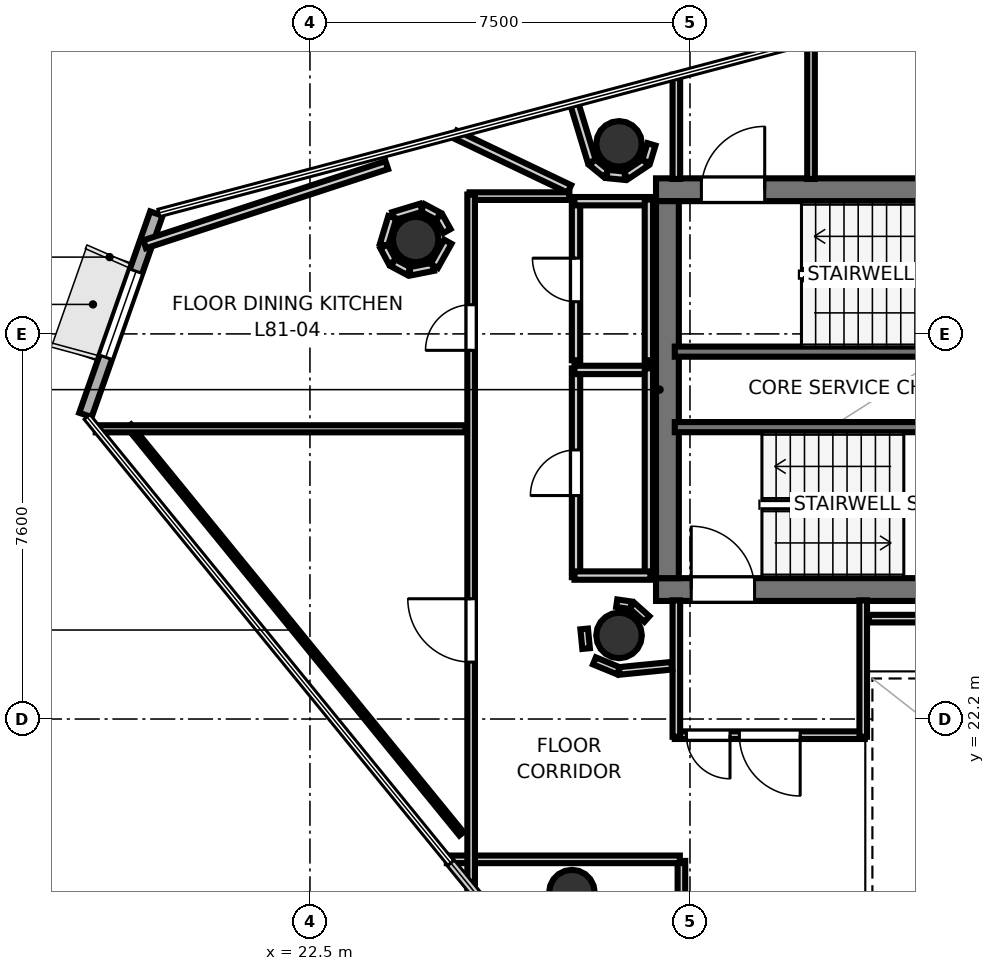
"""IFC4 building model, lengths in metres.
Left out: names, types, materials, properties, quantities, classifications, styles, units other than length and angle.
Written with IfcOpenShell. Run it as: python <this file> out.ifc"""

import sys

from ifc_helpers import new_model, si_unit, direction, frame, frame_2d, origin, origin_2d, place, context, subcontext, project, spatial, rectangle, hollow_circle, extrude, element, fill, save


model = new_model("IFC4")
c1 = context("Model", 3, precision=1e-05, world=origin(), true_north=direction((0.0, 1.0)))
c2 = subcontext(c1, "Body", "Model", "MODEL_VIEW")
j1 = project(units=[si_unit("LENGTHUNIT", "METRE"), si_unit("PLANEANGLEUNIT", "RADIAN")], contexts=[c1])
p1 = place(None, origin())
s1 = spatial("IfcSite", under=j1, at=p1, CompositionType="ELEMENT")
p2 = place(p1, origin())
s2 = spatial("IfcBuilding", under=s1, at=p2, CompositionType="ELEMENT")
p3 = place(p2, frame((0.0, 0.0, 313.9)))
s3 = spatial("IfcBuildingStorey", under=s2, at=p3, CompositionType="ELEMENT", Elevation=313.9)
p4 = place(p3, frame((29.33, 32.645, 0.0), z_axis=(0.0, 0.0, 1.0), x_axis=(1.0, 0.0, 0.0)))
e1 = element("IfcWall", 1, at=p4, inside=s3, PredefinedType="SHEAR", context=c2, shape_type="SweptSolid", body=[
    extrude(rectangle(XDim=10.52, YDim=0.45, at=frame_2d((5.26, 0.0))), origin(), (0.0, 0.0, 1.0), 3.52),
])
p5 = place(p4, frame((0.895, 0.0, 0.0)))
e2 = element("IfcOpeningElement", 2, at=p5, cuts=e1, PredefinedType="OPENING", context=c2, shape_type="SweptSolid", body=[
    extrude(rectangle(XDim=1.25, YDim=2.15, at=frame_2d((0.625, 1.075))), frame((0.0, 0.235, 0.0), z_axis=(0.0, -1.0, 0.0), x_axis=(1.0, 0.0, 0.0)), (0.0, 0.0, 1.0), 0.47),
])
p6 = place(p3, frame((29.33, 24.755, 0.0), z_axis=(0.0, 0.0, 1.0), x_axis=(1.0, 0.0, 0.0)))
e3 = element("IfcWall", 3, at=p6, inside=s3, PredefinedType="SHEAR", context=c2, shape_type="SweptSolid", body=[
    extrude(rectangle(XDim=10.52, YDim=0.45, at=frame_2d((5.26, 0.0))), origin(), (0.0, 0.0, 1.0), 3.52),
])
p7 = place(p6, frame((0.695, 0.0, 0.0)))
e4 = element("IfcOpeningElement", 4, at=p7, cuts=e3, PredefinedType="OPENING", context=c2, shape_type="SweptSolid", body=[
    extrude(rectangle(XDim=1.25, YDim=2.15, at=frame_2d((0.625, 1.075))), frame((0.0, 0.235, 0.0), z_axis=(0.0, -1.0, 0.0), x_axis=(1.0, 0.0, 0.0)), (0.0, 0.0, 1.0), 0.47),
])
p8 = place(p3, frame((29.555, 24.98, 0.0), z_axis=(0.0, 0.0, 1.0), x_axis=(0.0, 1.0, 0.0)))
e5 = element("IfcWall", 5, at=p8, inside=s3, PredefinedType="SHEAR", context=c2, shape_type="SweptSolid", body=[
    extrude(rectangle(XDim=7.44, YDim=0.45, at=frame_2d((3.72, 0.0))), origin(), (0.0, 0.0, 1.0), 3.52),
])
for number, where, z_axis, x_axis in (
    (6, (28.6, 33.55, 0.0), (0.0, 0.0, 1.0), (1.0, 0.0, 0.0)),
    (7, (28.6, 23.85, 0.0), (0.0, 0.0, 1.0), (1.0, 0.0, 0.0)),
    (8, (24.587, 31.663, 0.0), (0.0, 0.0, 1.0), (1.0, 0.0, 0.0)),
    (9, (27.67, 18.774, 0.0), (0.0, 0.0, 1.0), (1.0, 0.0, 0.0)),
):
    element("IfcColumn", number, at=place(p3, frame(where, z_axis=z_axis, x_axis=x_axis)), inside=s3, PredefinedType="COLUMN", context=c2, shape_type="SweptSolid", body=[
        extrude(hollow_circle(Radius=0.45, WallThickness=0.025, at=origin_2d()), origin(), (0.0, 0.0, 1.0), 3.7),
    ])
p9 = place(p3, frame((19.469, 32.174, 0.0), z_axis=(0.0, 0.0, 1.0), x_axis=(-0.332383607954, -0.943144282262, 0.0)))
e10 = element("IfcWall", 10, at=p9, inside=s3, PredefinedType="SOLIDWALL", context=c2, shape_type="SweptSolid", body=[
    extrude(rectangle(XDim=4.213, YDim=0.26, at=frame_2d((2.106, 0.0))), origin(), (0.0, 0.0, 1.0), 3.52),
])
p10 = place(p9, frame((1.207, 0.0, 0.85)))
e11 = element("IfcOpeningElement", 11, at=p10, cuts=e10, PredefinedType="OPENING", context=c2, shape_type="SweptSolid", body=[
    extrude(rectangle(XDim=1.8, YDim=2.1, at=frame_2d((0.9, 1.05))), frame((0.0, 0.14, 0.0), z_axis=(0.0, -1.0, 0.0), x_axis=(1.0, 0.0, 0.0)), (0.0, 0.0, 1.0), 0.28),
])
p11 = place(p3, frame((29.7, 29.45, 0.0), z_axis=(0.0, 0.0, 1.0), x_axis=(1.0, 0.0, 0.0)))
e12 = element("IfcWall", 12, at=p11, inside=s3, PredefinedType="SOLIDWALL", context=c2, shape_type="SweptSolid", body=[
    extrude(rectangle(XDim=8.3, YDim=0.2, at=frame_2d((4.15, 0.0))), origin(), (0.0, 0.0, 1.0), 3.52),
])
p12 = place(p3, frame((29.7, 27.96, 0.0), z_axis=(0.0, 0.0, 1.0), x_axis=(1.0, 0.0, 0.0)))
e13 = element("IfcWall", 13, at=p12, inside=s3, PredefinedType="SOLIDWALL", context=c2, shape_type="SweptSolid", body=[
    extrude(rectangle(XDim=7.75, YDim=0.2, at=frame_2d((3.875, 0.0))), origin(), (0.0, 0.0, 1.0), 3.52),
])
p13 = place(p3, frame((32.389, 35.619, 0.0), z_axis=(0.0, 0.0, 1.0), x_axis=(0.0, -1.0, 0.0)))
e14 = element("IfcWall", 14, at=p13, inside=s3, PredefinedType="PARTITIONING", context=c2, shape_type="SweptSolid", body=[
    extrude(rectangle(XDim=2.761, YDim=0.15, at=frame_2d((1.381, 0.0))), origin(), (0.0, 0.0, 1.0), 2.84),
])
p14 = place(p3, frame((29.731, 32.858, 0.0), z_axis=(0.0, 0.0, 1.0), x_axis=(0.0, 1.0, 0.0)))
e15 = element("IfcWall", 15, at=p14, inside=s3, PredefinedType="PARTITIONING", context=c2, shape_type="SweptSolid", body=[
    extrude(rectangle(XDim=2.057, YDim=0.15, at=frame_2d((1.028, 0.0))), origin(), (0.0, 0.0, 1.0), 2.84),
])
p15 = place(p3, frame((33.45, 21.881, 0.0), z_axis=(0.0, 0.0, 1.0), x_axis=(-1.0, 0.0, 0.0)))
e16 = element("IfcWall", 16, at=p15, inside=s3, PredefinedType="PARTITIONING", context=c2, shape_type="SweptSolid", body=[
    extrude(rectangle(XDim=3.75, YDim=0.15, at=frame_2d((1.875, 0.0))), origin(), (0.0, 0.0, 1.0), 2.84),
])
p16 = place(p15, frame((1.275, 0.0, 0.0)))
e17 = element("IfcOpeningElement", 17, at=p16, cuts=e16, PredefinedType="OPENING", context=c2, shape_type="SweptSolid", body=[
    extrude(rectangle(XDim=1.2, YDim=2.15, at=frame_2d((0.6, 1.075))), frame((0.0, 0.085, 0.0), z_axis=(0.0, -1.0, 0.0), x_axis=(1.0, 0.0, 0.0)), (0.0, 0.0, 1.0), 0.17),
])
p17 = place(p15, frame((2.66, 0.0, 0.0)))
e18 = element("IfcOpeningElement", 18, at=p17, cuts=e16, PredefinedType="OPENING", context=c2, shape_type="SweptSolid", body=[
    extrude(rectangle(XDim=0.86, YDim=2.05, at=frame_2d((0.43, 1.025))), frame((0.0, 0.085, 0.0), z_axis=(0.0, -1.0, 0.0), x_axis=(1.0, 0.0, 0.0)), (0.0, 0.0, 1.0), 0.17),
])
for number, where, z_axis, x_axis in (
    (19, (29.731, 21.85, 0.0), (0.0, 0.0, 1.0), (0.0, 1.0, 0.0)),
    (20, (33.419, 24.542, 0.0), (0.0, 0.0, 1.0), (0.0, -1.0, 0.0)),
):
    element("IfcWall", number, at=place(p3, frame(where, z_axis=z_axis, x_axis=x_axis)), inside=s3, PredefinedType="PARTITIONING", context=c2, shape_type="SweptSolid", body=[
        extrude(rectangle(XDim=2.692, YDim=0.15, at=frame_2d((1.346, 0.0))), origin(), (0.0, 0.0, 1.0), 2.84),
    ])
p18 = place(p3, frame((27.751, 25.0, 0.0), z_axis=(0.0, 0.0, 1.0), x_axis=(0.0, 1.0, 0.0)))
e21 = element("IfcWall", 21, at=p18, inside=s3, PredefinedType="PLUMBINGWALL", context=c2, shape_type="SweptSolid", body=[
    extrude(rectangle(XDim=4.12, YDim=0.165, at=frame_2d((2.06, 0.0))), origin(), (0.0, 0.0, 1.0), 2.84),
])
p19 = place(p18, frame((1.61, 0.0, 0.0)))
e22 = element("IfcOpeningElement", 22, at=p19, cuts=e21, PredefinedType="OPENING", context=c2, shape_type="SweptSolid", body=[
    extrude(rectangle(XDim=0.9, YDim=2.1, at=frame_2d((0.45, 1.05))), frame((0.0, 0.093, 0.0), z_axis=(0.0, -1.0, 0.0), x_axis=(1.0, 0.0, 0.0)), (0.0, 0.0, 1.0), 0.185),
])
p20 = place(p3, frame((27.72, 29.089, 0.0), z_axis=(0.0, 0.0, 1.0), x_axis=(1.0, 0.0, 0.0)))
e23 = element("IfcWall", 23, at=p20, inside=s3, PredefinedType="PLUMBINGWALL", context=c2, shape_type="SweptSolid", body=[
    extrude(rectangle(XDim=1.5, YDim=0.165, at=frame_2d((0.75, 0.0))), origin(), (0.0, 0.0, 1.0), 2.84),
])
p21 = place(p3, frame((29.189, 29.12, 0.0), z_axis=(0.0, 0.0, 1.0), x_axis=(0.0, -1.0, 0.0)))
e24 = element("IfcWall", 24, at=p21, inside=s3, PredefinedType="PLUMBINGWALL", context=c2, shape_type="SweptSolid", body=[
    extrude(rectangle(XDim=4.12, YDim=0.165, at=frame_2d((2.06, 0.0))), origin(), (0.0, 0.0, 1.0), 2.84),
])
p22 = place(p3, frame((29.22, 25.031, 0.0), z_axis=(0.0, 0.0, 1.0), x_axis=(-1.0, 0.0, 0.0)))
e25 = element("IfcWall", 25, at=p22, inside=s3, PredefinedType="PLUMBINGWALL", context=c2, shape_type="SweptSolid", body=[
    extrude(rectangle(XDim=1.5, YDim=0.165, at=frame_2d((0.75, 0.0))), origin(), (0.0, 0.0, 1.0), 2.84),
])
p23 = place(p3, frame((27.751, 29.28, 0.0), z_axis=(0.0, 0.0, 1.0), x_axis=(0.0, 1.0, 0.0)))
e26 = element("IfcWall", 26, at=p23, inside=s3, PredefinedType="PLUMBINGWALL", context=c2, shape_type="SweptSolid", body=[
    extrude(rectangle(XDim=3.17, YDim=0.165, at=frame_2d((1.585, 0.0))), origin(), (0.0, 0.0, 1.0), 2.84),
])
p24 = place(p23, frame((1.155, 0.0, 0.0)))
e27 = element("IfcOpeningElement", 27, at=p24, cuts=e26, PredefinedType="OPENING", context=c2, shape_type="SweptSolid", body=[
    extrude(rectangle(XDim=0.86, YDim=2.05, at=frame_2d((0.43, 1.025))), frame((0.0, 0.093, 0.0), z_axis=(0.0, -1.0, 0.0), x_axis=(1.0, 0.0, 0.0)), (0.0, 0.0, 1.0), 0.185),
])
p25 = place(p3, frame((27.72, 32.419, 0.0), z_axis=(0.0, 0.0, 1.0), x_axis=(1.0, 0.0, 0.0)))
e28 = element("IfcWall", 28, at=p25, inside=s3, PredefinedType="PLUMBINGWALL", context=c2, shape_type="SweptSolid", body=[
    extrude(rectangle(XDim=1.5, YDim=0.165, at=frame_2d((0.75, 0.0))), origin(), (0.0, 0.0, 1.0), 2.84),
])
p26 = place(p3, frame((29.189, 32.45, 0.0), z_axis=(0.0, 0.0, 1.0), x_axis=(0.0, -1.0, 0.0)))
e29 = element("IfcWall", 29, at=p26, inside=s3, PredefinedType="PLUMBINGWALL", context=c2, shape_type="SweptSolid", body=[
    extrude(rectangle(XDim=3.17, YDim=0.165, at=frame_2d((1.585, 0.0))), origin(), (0.0, 0.0, 1.0), 2.84),
])
p27 = place(p3, frame((37.872, 24.181, 0.0), z_axis=(0.0, 0.0, 1.0), x_axis=(-1.0, 0.0, 0.0)))
e30 = element("IfcWall", 30, at=p27, inside=s3, PredefinedType="PARTITIONING", context=c2, shape_type="SweptSolid", body=[
    extrude(rectangle(XDim=4.342, YDim=0.15, at=frame_2d((2.171, 0.0))), origin(), (0.0, 0.0, 1.0), 2.84),
])
p28 = place(p3, frame((29.149, 24.173, 0.0), z_axis=(0.0, 0.0, 1.0), x_axis=(-0.745225165416, 0.666812906917, 0.0)))
e31 = element("IfcWall", 31, at=p28, inside=s3, PredefinedType="PARTITIONING", context=c2, shape_type="SweptSolid", body=[
    extrude(rectangle(XDim=0.396, YDim=0.15, at=frame_2d((0.198, 0.0))), origin(), (0.0, 0.0, 1.0), 2.84),
])
p29 = place(p3, frame((28.838, 24.444, 0.0), z_axis=(0.0, 0.0, 1.0), x_axis=(-0.989449148305, 0.144880581578, 0.0)))
e32 = element("IfcWall", 32, at=p29, inside=s3, PredefinedType="PARTITIONING", context=c2, shape_type="SweptSolid", body=[
    extrude(rectangle(XDim=0.286, YDim=0.15, at=frame_2d((0.143, 0.0))), origin(), (0.0, 0.0, 1.0), 2.84),
])
p30 = place(p3, frame((25.65, 32.519, 0.0), z_axis=(0.0, 0.0, 1.0), x_axis=(1.0, 0.0, 0.0)))
e33 = element("IfcWall", 33, at=p30, inside=s3, PredefinedType="PARTITIONING", context=c2, shape_type="SweptSolid", body=[
    extrude(rectangle(XDim=1.97, YDim=0.15, at=frame_2d((0.985, 0.0))), origin(), (0.0, 0.0, 1.0), 2.84),
])
p31 = place(p3, frame((27.912, 23.978, 0.0), z_axis=(0.0, 0.0, 1.0), x_axis=(0.097888269922, -0.995197410875, 0.0)))
e34 = element("IfcWall", 34, at=p31, inside=s3, PredefinedType="PARTITIONING", context=c2, shape_type="SweptSolid", body=[
    extrude(rectangle(XDim=0.389, YDim=0.15, at=frame_2d((0.195, 0.0))), origin(), (0.0, 0.0, 1.0), 2.84),
])
p32 = place(p3, frame((28.115, 23.348, 0.0), z_axis=(0.0, 0.0, 1.0), x_axis=(0.923807847969, -0.382856448334, 0.0)))
e35 = element("IfcWall", 35, at=p32, inside=s3, PredefinedType="PARTITIONING", context=c2, shape_type="SweptSolid", body=[
    extrude(rectangle(XDim=0.513, YDim=0.15, at=frame_2d((0.256, 0.0))), origin(), (0.0, 0.0, 1.0), 2.84),
])
p33 = place(p3, frame((28.603, 23.149, 0.0), z_axis=(0.0, 0.0, 1.0), x_axis=(0.995179827095, 0.098066873836, 0.0)))
e36 = element("IfcWall", 36, at=p33, inside=s3, PredefinedType="PARTITIONING", context=c2, shape_type="SweptSolid", body=[
    extrude(rectangle(XDim=1.043, YDim=0.15, at=frame_2d((0.521, 0.0))), origin(), (0.0, 0.0, 1.0), 2.84),
])
p34 = place(p3, frame((29.831, 16.05, 0.0), z_axis=(0.0, 0.0, 1.0), x_axis=(0.0, 1.0, 0.0)))
e37 = element("IfcWall", 37, at=p34, inside=s3, PredefinedType="PARTITIONING", context=c2, shape_type="SweptSolid", body=[
    extrude(rectangle(XDim=3.35, YDim=0.15, at=frame_2d((1.675, 0.0))), origin(), (0.0, 0.0, 1.0), 2.84),
])
p35 = place(p3, frame((29.8, 19.431, 0.0), z_axis=(0.0, 0.0, 1.0), x_axis=(-1.0, 0.0, 0.0)))
e38 = element("IfcWall", 38, at=p35, inside=s3, PredefinedType="PARTITIONING", context=c2, shape_type="SweptSolid", body=[
    extrude(rectangle(XDim=4.599, YDim=0.15, at=frame_2d((2.299, 0.0))), origin(), (0.0, 0.0, 1.0), 2.84),
])
p36 = place(p3, frame((25.681, 18.847, 0.0), z_axis=(0.0, 0.0, 1.0), x_axis=(0.0, 1.0, 0.0)))
e39 = element("IfcWall", 39, at=p36, inside=s3, PredefinedType="PARTITIONING", context=c2, shape_type="SweptSolid", body=[
    extrude(rectangle(XDim=13.703, YDim=0.15, at=frame_2d((6.851, 0.0))), origin(), (0.0, 0.0, 1.0), 2.84),
])
p37 = place(p36, frame((4.476, 0.0, 0.0)))
e40 = element("IfcOpeningElement", 40, at=p37, cuts=e39, PredefinedType="OPENING", context=c2, shape_type="SweptSolid", body=[
    extrude(rectangle(XDim=1.25, YDim=2.2, at=frame_2d((0.625, 1.1))), frame((0.0, 0.085, 0.0), z_axis=(0.0, -1.0, 0.0), x_axis=(1.0, 0.0, 0.0)), (0.0, 0.0, 1.0), 0.17),
])
p38 = place(p36, frame((10.628, 0.0, 0.0)))
e41 = element("IfcOpeningElement", 41, at=p38, cuts=e39, PredefinedType="OPENING", context=c2, shape_type="SweptSolid", body=[
    extrude(rectangle(XDim=0.9, YDim=2.1, at=frame_2d((0.45, 1.05))), frame((0.0, 0.085, 0.0), z_axis=(0.0, -1.0, 0.0), x_axis=(1.0, 0.0, 0.0)), (0.0, 0.0, 1.0), 0.17),
])
p39 = place(p3, frame((25.489, 19.935, 0.0), z_axis=(0.0, 0.0, 1.0), x_axis=(-0.632036778689, 0.774938391348, 0.0)))
e42 = element("IfcWall", 42, at=p39, inside=s3, PredefinedType="PARTITIONING", context=c2, shape_type="SweptSolid", body=[
    extrude(rectangle(XDim=10.379, YDim=0.105, at=frame_2d((5.189, 0.0))), origin(), (0.0, 0.0, 1.0), 2.84),
])
p40 = place(p3, frame((18.272, 27.927, 0.0), z_axis=(0.0, 0.0, 1.0), x_axis=(1.0, 0.0, 0.0)))
e43 = element("IfcWall", 43, at=p40, inside=s3, PredefinedType="PARTITIONING", context=c2, shape_type="SweptSolid", body=[
    extrude(rectangle(XDim=7.3, YDim=0.14, at=frame_2d((3.65, 0.0))), origin(), (0.0, 0.0, 1.0), 2.84),
])
p41 = place(p3, frame((27.62, 32.661, 0.0), z_axis=(0.0, 0.0, 1.0), x_axis=(-0.902520737302, 0.430646396409, 0.0)))
e44 = element("IfcWall", 44, at=p41, inside=s3, PredefinedType="PLUMBINGWALL", context=c2, shape_type="SweptSolid", body=[
    extrude(rectangle(XDim=2.499, YDim=0.165, at=frame_2d((1.25, 0.0))), origin(), (0.0, 0.0, 1.0), 2.84),
])
p42 = place(p3, frame((25.203, 31.829, 0.0), z_axis=(0.0, 0.0, 1.0), x_axis=(-0.488926990846, 0.872324708823, 0.0)))
e45 = element("IfcWall", 45, at=p42, inside=s3, PredefinedType="PLUMBINGWALL", context=c2, shape_type="SweptSolid", body=[
    extrude(rectangle(XDim=0.322, YDim=0.165, at=frame_2d((0.161, 0.0))), origin(), (0.0, 0.0, 1.0), 2.84),
])
p43 = place(p3, frame((25.033, 32.122, 0.0), z_axis=(0.0, 0.0, 1.0), x_axis=(-0.881817981942, 0.471589913721, 0.0)))
e46 = element("IfcWall", 46, at=p43, inside=s3, PredefinedType="PLUMBINGWALL", context=c2, shape_type="SweptSolid", body=[
    extrude(rectangle(XDim=0.354, YDim=0.165, at=frame_2d((0.177, 0.0))), origin(), (0.0, 0.0, 1.0), 2.84),
])
for number, where, z_axis, x_axis in (
    (47, (24.697, 32.291, 0.0), (0.0, 0.0, 1.0), (-0.957, -0.29, 0.0)),
    (48, (24.126, 32.103, 0.0), (0.0, 0.0, 1.0), (-0.29, -0.957, 0.0)),
):
    element("IfcWall", number, at=place(p3, frame(where, z_axis=z_axis, x_axis=x_axis)), inside=s3, PredefinedType="PLUMBINGWALL", context=c2, shape_type="SweptSolid", body=[
        extrude(rectangle(XDim=0.575, YDim=0.165, at=frame_2d((0.288, 0.0))), origin(), (0.0, 0.0, 1.0), 2.84),
    ])
for number, where, z_axis, x_axis in (
    (49, (23.961, 31.529, 0.0), (0.0, 0.0, 1.0), (0.472, -0.882, 0.0)),
    (50, (24.141, 31.204, 0.0), (0.0, 0.0, 1.0), (0.882, -0.472, 0.0)),
):
    element("IfcWall", number, at=place(p3, frame(where, z_axis=z_axis, x_axis=x_axis)), inside=s3, PredefinedType="PLUMBINGWALL", context=c2, shape_type="SweptSolid", body=[
        extrude(rectangle(XDim=0.354, YDim=0.165, at=frame_2d((0.177, 0.0))), origin(), (0.0, 0.0, 1.0), 2.84),
    ])
p44 = place(p3, frame((24.474, 31.034, 0.0), z_axis=(0.0, 0.0, 1.0), x_axis=(0.980681129405, 0.195613195945, 0.0)))
e51 = element("IfcWall", 51, at=p44, inside=s3, PredefinedType="PLUMBINGWALL", context=c2, shape_type="SweptSolid", body=[
    extrude(rectangle(XDim=0.467, YDim=0.165, at=frame_2d((0.233, 0.0))), origin(), (0.0, 0.0, 1.0), 2.84),
])
p45 = place(p3, frame((24.953, 31.141, 0.0), z_axis=(0.0, 0.0, 1.0), x_axis=(0.489267492682, 0.872133774489, 0.0)))
e52 = element("IfcWall", 52, at=p45, inside=s3, PredefinedType="PLUMBINGWALL", context=c2, shape_type="SweptSolid", body=[
    extrude(rectangle(XDim=0.548, YDim=0.165, at=frame_2d((0.274, 0.0))), origin(), (0.0, 0.0, 1.0), 2.84),
])
p46 = place(p3, frame((19.239, 31.569, 0.0), z_axis=(0.0, 0.0, 1.0), x_axis=(0.95047932384, 0.310787797305, 0.0)))
e53 = element("IfcWall", 53, at=p46, inside=s3, PredefinedType="PLUMBINGWALL", context=c2, shape_type="SweptSolid", body=[
    extrude(rectangle(XDim=5.027, YDim=0.165, at=frame_2d((2.513, 0.0))), origin(), (0.0, 0.0, 1.0), 2.84),
])
p47 = place(p3, frame((27.706, 34.378, 0.0), z_axis=(0.0, 0.0, 1.0), x_axis=(0.29018930869, -0.956969260281, 0.0)))
e54 = element("IfcWall", 54, at=p47, inside=s3, PredefinedType="PLUMBINGWALL", context=c2, shape_type="SweptSolid", body=[
    extrude(rectangle(XDim=1.229, YDim=0.165, at=frame_2d((0.615, 0.0))), origin(), (0.0, 0.0, 1.0), 2.84),
])
for number, where, z_axis, x_axis in (
    (55, (28.073, 33.187, 0.0), (0.0, 0.0, 1.0), (0.773, -0.634, 0.0)),
    (56, (28.364, 32.956, 0.0), (0.0, 0.0, 1.0), (0.995, -0.098, 0.0)),
):
    element("IfcWall", number, at=place(p3, frame(where, z_axis=z_axis, x_axis=x_axis)), inside=s3, PredefinedType="PLUMBINGWALL", context=c2, shape_type="SweptSolid", body=[
        extrude(rectangle(XDim=0.354, YDim=0.165, at=frame_2d((0.177, 0.0))), origin(), (0.0, 0.0, 1.0), 2.84),
    ])
p48 = place(p3, frame((28.736, 32.926, 0.0), z_axis=(0.0, 0.0, 1.0), x_axis=(0.831487045435, 0.555544141607, 0.0)))
e57 = element("IfcWall", 57, at=p48, inside=s3, PredefinedType="PLUMBINGWALL", context=c2, shape_type="SweptSolid", body=[
    extrude(rectangle(XDim=0.467, YDim=0.165, at=frame_2d((0.233, 0.0))), origin(), (0.0, 0.0, 1.0), 2.84),
])
p49 = place(p3, frame((29.137, 33.202, 0.0), z_axis=(0.0, 0.0, 1.0), x_axis=(0.290256142171, 0.956948991291, 0.0)))
e58 = element("IfcWall", 58, at=p49, inside=s3, PredefinedType="PLUMBINGWALL", context=c2, shape_type="SweptSolid", body=[
    extrude(rectangle(XDim=0.354, YDim=0.165, at=frame_2d((0.177, 0.0))), origin(), (0.0, 0.0, 1.0), 2.84),
])
p50 = place(p5, origin())
e59 = element("IfcDoor", 59, at=p50, inside=s3, OperationType="SINGLE_SWING_RIGHT", PredefinedType="DOOR", context=c2, shape_type="SweptSolid", body=[
    extrude(rectangle(XDim=1.25, YDim=2.15, at=frame_2d((0.625, 1.075))), frame((0.0, 0.025, 0.0), z_axis=(0.0, -1.0, 0.0), x_axis=(1.0, 0.0, 0.0)), (0.0, 0.0, 1.0), 0.05),
])
fill(e2, e59)
p51 = place(p7, origin())
e60 = element("IfcDoor", 60, at=p51, inside=s3, OperationType="SINGLE_SWING_LEFT", PredefinedType="DOOR", context=c2, shape_type="SweptSolid", body=[
    extrude(rectangle(XDim=1.25, YDim=2.15, at=frame_2d((0.625, 1.075))), frame((0.0, 0.025, 0.0), z_axis=(0.0, -1.0, 0.0), x_axis=(1.0, 0.0, 0.0)), (0.0, 0.0, 1.0), 0.05),
])
fill(e4, e60)
p52 = place(p16, origin())
e61 = element("IfcDoor", 61, at=p52, inside=s3, OperationType="SINGLE_SWING_LEFT", PredefinedType="DOOR", context=c2, shape_type="SweptSolid", body=[
    extrude(rectangle(XDim=1.2, YDim=2.15, at=frame_2d((0.6, 1.075))), frame((0.0, 0.025, 0.0), z_axis=(0.0, -1.0, 0.0), x_axis=(1.0, 0.0, 0.0)), (0.0, 0.0, 1.0), 0.05),
])
fill(e17, e61)
p53 = place(p19, origin())
e62 = element("IfcDoor", 62, at=p53, inside=s3, OperationType="SINGLE_SWING_LEFT", PredefinedType="DOOR", context=c2, shape_type="SweptSolid", body=[
    extrude(rectangle(XDim=0.9, YDim=2.1, at=frame_2d((0.45, 1.05))), frame((0.0, 0.025, 0.0), z_axis=(0.0, -1.0, 0.0), x_axis=(1.0, 0.0, 0.0)), (0.0, 0.0, 1.0), 0.05),
])
fill(e22, e62)
p54 = place(p24, origin())
e63 = element("IfcDoor", 63, at=p54, inside=s3, OperationType="SINGLE_SWING_RIGHT", PredefinedType="DOOR", context=c2, shape_type="SweptSolid", body=[
    extrude(rectangle(XDim=0.86, YDim=2.05, at=frame_2d((0.43, 1.025))), frame((0.0, 0.025, 0.0), z_axis=(0.0, -1.0, 0.0), x_axis=(1.0, 0.0, 0.0)), (0.0, 0.0, 1.0), 0.05),
])
fill(e27, e63)
p55 = place(p17, origin())
e64 = element("IfcDoor", 64, at=p55, inside=s3, OperationType="SINGLE_SWING_LEFT", PredefinedType="DOOR", context=c2, shape_type="SweptSolid", body=[
    extrude(rectangle(XDim=0.86, YDim=2.05, at=frame_2d((0.43, 1.025))), frame((0.0, 0.025, 0.0), z_axis=(0.0, -1.0, 0.0), x_axis=(1.0, 0.0, 0.0)), (0.0, 0.0, 1.0), 0.05),
])
fill(e18, e64)
p56 = place(p37, origin())
e65 = element("IfcDoor", 65, at=p56, inside=s3, OperationType="SINGLE_SWING_RIGHT", PredefinedType="DOOR", context=c2, shape_type="SweptSolid", body=[
    extrude(rectangle(XDim=1.25, YDim=2.2, at=frame_2d((0.625, 1.1))), frame((0.0, 0.025, 0.0), z_axis=(0.0, -1.0, 0.0), x_axis=(1.0, 0.0, 0.0)), (0.0, 0.0, 1.0), 0.05),
])
fill(e40, e65)
p57 = place(p38, origin())
e66 = element("IfcDoor", 66, at=p57, inside=s3, OperationType="SINGLE_SWING_LEFT", PredefinedType="DOOR", context=c2, shape_type="SweptSolid", body=[
    extrude(rectangle(XDim=0.9, YDim=2.1, at=frame_2d((0.45, 1.05))), frame((0.0, 0.025, 0.0), z_axis=(0.0, -1.0, 0.0), x_axis=(1.0, 0.0, 0.0)), (0.0, 0.0, 1.0), 0.05),
])
fill(e41, e66)
p58 = place(p10, origin())
e67 = element("IfcWindow", 67, at=p58, inside=s3, PartitioningType="SINGLE_PANEL", PredefinedType="WINDOW", context=c2, shape_type="SweptSolid", body=[
    extrude(rectangle(XDim=1.8, YDim=2.1, at=frame_2d((0.9, 1.05))), frame((0.0, 0.03, 0.0), z_axis=(0.0, -1.0, 0.0), x_axis=(1.0, 0.0, 0.0)), (0.0, 0.0, 1.0), 0.06),
])
fill(e11, e67)
save(model, sys.argv[1])
